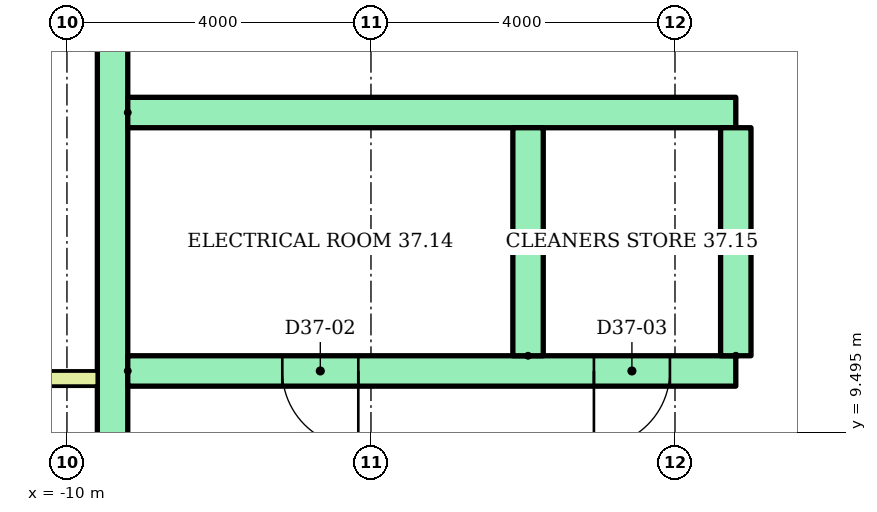
"""IFC4 building model, lengths in metres.
Left out: names, types, materials, properties, quantities, classifications, styles, units other than length and angle.
Written with IfcOpenShell. Run it as: python <this file> out.ifc"""

import sys

from ifc_helpers import new_model, si_unit, direction, frame, frame_2d, origin, place, context, subcontext, project, spatial, rectangle, extrude, element, fill, save


model = new_model("IFC4")
c1 = context("Model", 3, precision=1e-05, world=origin(), true_north=direction((0.0, 1.0)))
c2 = subcontext(c1, "Body", "Model", "MODEL_VIEW")
j1 = project(units=[si_unit("LENGTHUNIT", "METRE"), si_unit("PLANEANGLEUNIT", "RADIAN")], contexts=[c1])
p1 = place(None, origin())
s1 = spatial("IfcSite", under=j1, at=p1, CompositionType="ELEMENT")
p2 = place(p1, origin())
s2 = spatial("IfcBuilding", under=s1, at=p2, CompositionType="ELEMENT")
p3 = place(p2, frame((0.0, 0.0, 142.2)))
s3 = spatial("IfcBuildingStorey", under=s2, at=p3, CompositionType="ELEMENT", Elevation=142.2)
p4 = place(p3, frame((-9.4, 6.8, 0.0), z_axis=(0.0, 0.0, 1.0), x_axis=(0.0, 1.0, 0.0)))
e1 = element("IfcWall", 1, at=p4, inside=s3, PredefinedType="SHEAR", context=c2, shape_type="SweptSolid", body=[
    extrude(rectangle(XDim=12.7, YDim=0.4, at=frame_2d((6.35, 0.0))), origin(), (0.0, 0.0, 1.0), 2.92),
])
p5 = place(p4, frame((1.15, 0.0, 0.0)))
e2 = element("IfcOpeningElement", 2, at=p5, cuts=e1, PredefinedType="OPENING", context=c2, shape_type="SweptSolid", body=[
    extrude(rectangle(XDim=1.0, YDim=2.1, at=frame_2d((0.5, 1.05))), frame((0.0, 0.21, 0.0), z_axis=(0.0, -1.0, 0.0), x_axis=(1.0, 0.0, 0.0)), (0.0, 0.0, 1.0), 0.42),
])
p6 = place(p4, frame((7.925, 0.0, 0.0)))
e3 = element("IfcOpeningElement", 3, at=p6, cuts=e1, PredefinedType="OPENING", context=c2, shape_type="SweptSolid", body=[
    extrude(rectangle(XDim=1.0, YDim=2.1, at=frame_2d((0.5, 1.05))), frame((0.0, 0.21, 0.0), z_axis=(0.0, -1.0, 0.0), x_axis=(1.0, 0.0, 0.0)), (0.0, 0.0, 1.0), 0.42),
])
p7 = place(p3, frame((-9.2, 10.3, 0.0)))
e4 = element("IfcWall", 4, at=p7, inside=s3, PredefinedType="SHEAR", context=c2, shape_type="SweptSolid", body=[
    extrude(rectangle(XDim=8.0, YDim=0.4, at=frame_2d((4.0, 0.0))), origin(), (0.0, 0.0, 1.0), 2.92),
])
p8 = place(p7, frame((2.033, 0.0, 0.0)))
e5 = element("IfcOpeningElement", 5, at=p8, cuts=e4, PredefinedType="OPENING", context=c2, shape_type="SweptSolid", body=[
    extrude(rectangle(XDim=1.0, YDim=2.1, at=frame_2d((0.5, 1.05))), frame((0.0, 0.21, 0.0), z_axis=(0.0, -1.0, 0.0), x_axis=(1.0, 0.0, 0.0)), (0.0, 0.0, 1.0), 0.42),
])
p9 = place(p7, frame((6.133, 0.0, 0.0)))
e6 = element("IfcOpeningElement", 6, at=p9, cuts=e4, PredefinedType="OPENING", context=c2, shape_type="SweptSolid", body=[
    extrude(rectangle(XDim=1.0, YDim=2.1, at=frame_2d((0.5, 1.05))), frame((0.0, 0.21, 0.0), z_axis=(0.0, -1.0, 0.0), x_axis=(1.0, 0.0, 0.0)), (0.0, 0.0, 1.0), 0.42),
])
p10 = place(p3, frame((-9.2, 13.7, 0.0)))
e7 = element("IfcWall", 7, at=p10, inside=s3, PredefinedType="SHEAR", context=c2, shape_type="SweptSolid", body=[
    extrude(rectangle(XDim=8.0, YDim=0.4, at=frame_2d((4.0, 0.0))), origin(), (0.0, 0.0, 1.0), 2.92),
])
for number, where, z_axis, x_axis in (
    (8, (-3.933, 10.5, 0.0), (0.0, 0.0, 1.0), (0.0, 1.0, 0.0)),
    (9, (-1.2, 10.5, 0.0), (0.0, 0.0, 1.0), (0.0, 1.0, 0.0)),
):
    element("IfcWall", number, at=place(p3, frame(where, z_axis=z_axis, x_axis=x_axis)), inside=s3, PredefinedType="SHEAR", context=c2, shape_type="SweptSolid", body=[
        extrude(rectangle(XDim=3.0, YDim=0.4, at=frame_2d((1.5, 0.0))), origin(), (0.0, 0.0, 1.0), 2.92),
    ])
p11 = place(p3, frame((-13.5, 10.2, 0.0)))
e10 = element("IfcWall", 10, at=p11, inside=s3, PredefinedType="PARTITIONING", context=c2, shape_type="SweptSolid", body=[
    extrude(rectangle(XDim=3.9, YDim=0.2, at=frame_2d((1.95, 0.0))), origin(), (0.0, 0.0, 1.0), 2.92),
])
p12 = place(p8, frame((1.0, 0.0, 0.0), z_axis=(0.0, 0.0, 1.0), x_axis=(-1.0, 0.0, 0.0)))
e11 = element("IfcDoor", 11, at=p12, inside=s3, OperationType="SINGLE_SWING_RIGHT", PredefinedType="DOOR", context=c2, shape_type="SweptSolid", body=[
    extrude(rectangle(XDim=1.0, YDim=2.1, at=frame_2d((0.5, 1.05))), frame((0.0, 0.025, 0.0), z_axis=(0.0, -1.0, 0.0), x_axis=(1.0, 0.0, 0.0)), (0.0, 0.0, 1.0), 0.05),
])
fill(e5, e11)
p13 = place(p9, frame((1.0, 0.0, 0.0), z_axis=(0.0, 0.0, 1.0), x_axis=(-1.0, 0.0, 0.0)))
e12 = element("IfcDoor", 12, at=p13, inside=s3, OperationType="SINGLE_SWING_LEFT", PredefinedType="DOOR", context=c2, shape_type="SweptSolid", body=[
    extrude(rectangle(XDim=1.0, YDim=2.1, at=frame_2d((0.5, 1.05))), frame((0.0, 0.025, 0.0), z_axis=(0.0, -1.0, 0.0), x_axis=(1.0, 0.0, 0.0)), (0.0, 0.0, 1.0), 0.05),
])
fill(e6, e12)
save(model, sys.argv[1])
